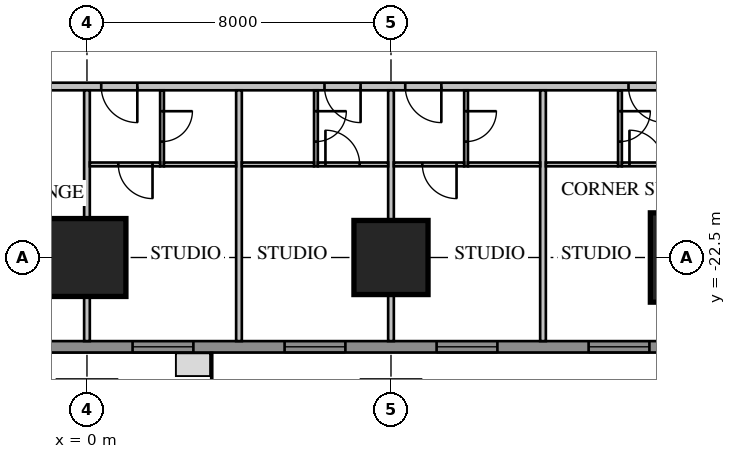
"""IFC4 building model, lengths in metres.
Left out: names, types, materials, properties, quantities, classifications, styles, units other than length and angle.
Written with IfcOpenShell. Run it as: python <this file> out.ifc"""

import sys

from ifc_helpers import new_model, si_unit, direction, frame, frame_2d, origin, origin_2d, place, context, subcontext, project, spatial, rectangle, extrude, element, fill, save


model = new_model("IFC4")
c1 = context("Model", 3, precision=1e-05, world=origin(), true_north=direction((0.0, 1.0)))
c2 = subcontext(c1, "Body", "Model", "MODEL_VIEW")
j1 = project(units=[si_unit("LENGTHUNIT", "METRE"), si_unit("PLANEANGLEUNIT", "RADIAN")], contexts=[c1])
p1 = place(None, origin())
s1 = spatial("IfcSite", under=j1, at=p1, CompositionType="ELEMENT")
p2 = place(p1, origin())
s2 = spatial("IfcBuilding", under=s1, at=p2, CompositionType="ELEMENT")
p3 = place(p2, frame((0.0, 0.0, 31.4)))
s3 = spatial("IfcBuildingStorey", under=s2, at=p3, CompositionType="ELEMENT", Elevation=31.4)
p4 = place(p3, frame((0.0, -22.5, 0.0), z_axis=(0.0, 0.0, 1.0), x_axis=(1.0, 0.0, 0.0)))
e1 = element("IfcColumn", 1, at=p4, inside=s3, PredefinedType="COLUMN", context=c2, shape_type="SweptSolid", body=[
    extrude(rectangle(XDim=2.05, YDim=2.05, at=origin_2d()), origin(), (0.0, 0.0, 1.0), 3.85),
])
p5 = place(p3, frame((8.0, -22.5, 0.0), z_axis=(0.0, 0.0, 1.0), x_axis=(1.0, 0.0, 0.0)))
e2 = element("IfcColumn", 2, at=p5, inside=s3, PredefinedType="COLUMN", context=c2, shape_type="SweptSolid", body=[
    extrude(rectangle(XDim=1.95, YDim=1.95, at=origin_2d()), origin(), (0.0, 0.0, 1.0), 3.85),
])
p6 = place(p3, frame((16.0, -22.5, 0.0), z_axis=(0.0, 0.0, 1.0), x_axis=(1.0, 0.0, 0.0)))
e3 = element("IfcColumn", 3, at=p6, inside=s3, PredefinedType="COLUMN", context=c2, shape_type="SweptSolid", body=[
    extrude(rectangle(XDim=2.35, YDim=2.35, at=origin_2d()), origin(), (0.0, 0.0, 1.0), 3.85),
])
p7 = place(p3, frame((-16.0, -24.85, 0.0), z_axis=(0.0, 0.0, 1.0), x_axis=(1.0, 0.0, 0.0)))
e4 = element("IfcWall", 4, at=p7, inside=s3, PredefinedType="SOLIDWALL", context=c2, shape_type="SweptSolid", body=[
    extrude(rectangle(XDim=32.0, YDim=0.3, at=frame_2d((16.0, 0.0))), origin(), (0.0, 0.0, 1.0), 3.65),
])
p8 = place(p7, frame((1.2, 0.0, 0.75)))
e5 = element("IfcOpeningElement", 5, at=p8, cuts=e4, PredefinedType="OPENING", context=c2, shape_type="SweptSolid", body=[
    extrude(rectangle(XDim=1.6, YDim=1.8, at=frame_2d((0.8, 0.9))), frame((0.0, 0.17, 0.0), z_axis=(0.0, -1.0, 0.0), x_axis=(1.0, 0.0, 0.0)), (0.0, 0.0, 1.0), 0.34),
])
p9 = place(p7, frame((5.2, 0.0, 0.75)))
e6 = element("IfcOpeningElement", 6, at=p9, cuts=e4, PredefinedType="OPENING", context=c2, shape_type="SweptSolid", body=[
    extrude(rectangle(XDim=1.6, YDim=1.8, at=frame_2d((0.8, 0.9))), frame((0.0, 0.17, 0.0), z_axis=(0.0, -1.0, 0.0), x_axis=(1.0, 0.0, 0.0)), (0.0, 0.0, 1.0), 0.34),
])
p10 = place(p7, frame((17.2, 0.0, 0.75)))
e7 = element("IfcOpeningElement", 7, at=p10, cuts=e4, PredefinedType="OPENING", context=c2, shape_type="SweptSolid", body=[
    extrude(rectangle(XDim=1.6, YDim=1.8, at=frame_2d((0.8, 0.9))), frame((0.0, 0.17, 0.0), z_axis=(0.0, -1.0, 0.0), x_axis=(1.0, 0.0, 0.0)), (0.0, 0.0, 1.0), 0.34),
])
p11 = place(p7, frame((21.2, 0.0, 0.75)))
e8 = element("IfcOpeningElement", 8, at=p11, cuts=e4, PredefinedType="OPENING", context=c2, shape_type="SweptSolid", body=[
    extrude(rectangle(XDim=1.6, YDim=1.8, at=frame_2d((0.8, 0.9))), frame((0.0, 0.17, 0.0), z_axis=(0.0, -1.0, 0.0), x_axis=(1.0, 0.0, 0.0)), (0.0, 0.0, 1.0), 0.34),
])
p12 = place(p7, frame((25.2, 0.0, 0.75)))
e9 = element("IfcOpeningElement", 9, at=p12, cuts=e4, PredefinedType="OPENING", context=c2, shape_type="SweptSolid", body=[
    extrude(rectangle(XDim=1.6, YDim=1.8, at=frame_2d((0.8, 0.9))), frame((0.0, 0.17, 0.0), z_axis=(0.0, -1.0, 0.0), x_axis=(1.0, 0.0, 0.0)), (0.0, 0.0, 1.0), 0.34),
])
p13 = place(p7, frame((29.2, 0.0, 0.75)))
e10 = element("IfcOpeningElement", 10, at=p13, cuts=e4, PredefinedType="OPENING", context=c2, shape_type="SweptSolid", body=[
    extrude(rectangle(XDim=1.6, YDim=1.8, at=frame_2d((0.8, 0.9))), frame((0.0, 0.17, 0.0), z_axis=(0.0, -1.0, 0.0), x_axis=(1.0, 0.0, 0.0)), (0.0, 0.0, 1.0), 0.34),
])
p14 = place(p7, frame((8.8, 0.0, 0.75)))
e11 = element("IfcOpeningElement", 11, at=p14, cuts=e4, PredefinedType="OPENING", context=c2, shape_type="SweptSolid", body=[
    extrude(rectangle(XDim=2.4, YDim=1.8, at=frame_2d((1.2, 0.9))), frame((0.0, 0.17, 0.0), z_axis=(0.0, -1.0, 0.0), x_axis=(1.0, 0.0, 0.0)), (0.0, 0.0, 1.0), 0.34),
])
p15 = place(p7, frame((13.812, 0.0, 0.0)))
e12 = element("IfcOpeningElement", 12, at=p15, cuts=e4, PredefinedType="OPENING", context=c2, shape_type="SweptSolid", body=[
    extrude(rectangle(XDim=1.0, YDim=2.4, at=frame_2d((0.5, 1.2))), frame((0.0, 0.17, 0.0), z_axis=(0.0, -1.0, 0.0), x_axis=(1.0, 0.0, 0.0)), (0.0, 0.0, 1.0), 0.34),
])
p16 = place(p3, frame((-18.0, -18.0, 0.0), z_axis=(0.0, 0.0, 1.0), x_axis=(1.0, 0.0, 0.0)))
e13 = element("IfcWall", 13, at=p16, inside=s3, PredefinedType="PARTITIONING", context=c2, shape_type="SweptSolid", body=[
    extrude(rectangle(XDim=36.0, YDim=0.2, at=frame_2d((18.0, 0.0))), origin(), (0.0, 0.0, 1.0), 3.65),
])
p17 = place(p16, frame((0.375, 0.0, 0.0)))
e14 = element("IfcOpeningElement", 14, at=p17, cuts=e13, PredefinedType="OPENING", context=c2, shape_type="SweptSolid", body=[
    extrude(rectangle(XDim=1.0, YDim=2.1, at=frame_2d((0.5, 1.05))), frame((0.0, 0.12, 0.0), z_axis=(0.0, -1.0, 0.0), x_axis=(1.0, 0.0, 0.0)), (0.0, 0.0, 1.0), 0.24),
])
p18 = place(p16, frame((2.45, 0.0, 0.0)))
e15 = element("IfcOpeningElement", 15, at=p18, cuts=e13, PredefinedType="OPENING", context=c2, shape_type="SweptSolid", body=[
    extrude(rectangle(XDim=0.8, YDim=2.1, at=frame_2d((0.4, 1.05))), frame((0.0, 0.12, 0.0), z_axis=(0.0, -1.0, 0.0), x_axis=(1.0, 0.0, 0.0)), (0.0, 0.0, 1.0), 0.24),
])
p19 = place(p16, frame((4.05, 0.0, 0.0)))
e16 = element("IfcOpeningElement", 16, at=p19, cuts=e13, PredefinedType="OPENING", context=c2, shape_type="SweptSolid", body=[
    extrude(rectangle(XDim=1.0, YDim=2.1, at=frame_2d((0.5, 1.05))), frame((0.0, 0.12, 0.0), z_axis=(0.0, -1.0, 0.0), x_axis=(1.0, 0.0, 0.0)), (0.0, 0.0, 1.0), 0.24),
])
p20 = place(p16, frame((6.45, 0.0, 0.0)))
e17 = element("IfcOpeningElement", 17, at=p20, cuts=e13, PredefinedType="OPENING", context=c2, shape_type="SweptSolid", body=[
    extrude(rectangle(XDim=0.9, YDim=2.1, at=frame_2d((0.45, 1.05))), frame((0.0, 0.12, 0.0), z_axis=(0.0, -1.0, 0.0), x_axis=(1.0, 0.0, 0.0)), (0.0, 0.0, 1.0), 0.24),
])
p21 = place(p16, frame((8.15, 0.0, 0.0)))
e18 = element("IfcOpeningElement", 18, at=p21, cuts=e13, PredefinedType="OPENING", context=c2, shape_type="SweptSolid", body=[
    extrude(rectangle(XDim=1.0, YDim=2.1, at=frame_2d((0.5, 1.05))), frame((0.0, 0.12, 0.0), z_axis=(0.0, -1.0, 0.0), x_axis=(1.0, 0.0, 0.0)), (0.0, 0.0, 1.0), 0.24),
])
p22 = place(p16, frame((18.375, 0.0, 0.0)))
e19 = element("IfcOpeningElement", 19, at=p22, cuts=e13, PredefinedType="OPENING", context=c2, shape_type="SweptSolid", body=[
    extrude(rectangle(XDim=0.95, YDim=2.1, at=frame_2d((0.475, 1.05))), frame((0.0, 0.12, 0.0), z_axis=(0.0, -1.0, 0.0), x_axis=(1.0, 0.0, 0.0)), (0.0, 0.0, 1.0), 0.24),
])
p23 = place(p16, frame((24.25, 0.0, 0.0)))
e20 = element("IfcOpeningElement", 20, at=p23, cuts=e13, PredefinedType="OPENING", context=c2, shape_type="SweptSolid", body=[
    extrude(rectangle(XDim=0.95, YDim=2.1, at=frame_2d((0.475, 1.05))), frame((0.0, 0.12, 0.0), z_axis=(0.0, -1.0, 0.0), x_axis=(1.0, 0.0, 0.0)), (0.0, 0.0, 1.0), 0.24),
])
p24 = place(p16, frame((26.375, 0.0, 0.0)))
e21 = element("IfcOpeningElement", 21, at=p24, cuts=e13, PredefinedType="OPENING", context=c2, shape_type="SweptSolid", body=[
    extrude(rectangle(XDim=0.95, YDim=2.1, at=frame_2d((0.475, 1.05))), frame((0.0, 0.12, 0.0), z_axis=(0.0, -1.0, 0.0), x_axis=(1.0, 0.0, 0.0)), (0.0, 0.0, 1.0), 0.24),
])
p25 = place(p16, frame((32.25, 0.0, 0.0)))
e22 = element("IfcOpeningElement", 22, at=p25, cuts=e13, PredefinedType="OPENING", context=c2, shape_type="SweptSolid", body=[
    extrude(rectangle(XDim=0.95, YDim=2.1, at=frame_2d((0.475, 1.05))), frame((0.0, 0.12, 0.0), z_axis=(0.0, -1.0, 0.0), x_axis=(1.0, 0.0, 0.0)), (0.0, 0.0, 1.0), 0.24),
])
p26 = place(p16, frame((34.375, 0.0, 0.0)))
e23 = element("IfcOpeningElement", 23, at=p26, cuts=e13, PredefinedType="OPENING", context=c2, shape_type="SweptSolid", body=[
    extrude(rectangle(XDim=0.95, YDim=2.1, at=frame_2d((0.475, 1.05))), frame((0.0, 0.12, 0.0), z_axis=(0.0, -1.0, 0.0), x_axis=(1.0, 0.0, 0.0)), (0.0, 0.0, 1.0), 0.24),
])
p27 = place(p16, frame((11.2, 0.0, 0.0)))
e24 = element("IfcOpeningElement", 24, at=p27, cuts=e13, PredefinedType="OPENING", context=c2, shape_type="SweptSolid", body=[
    extrude(rectangle(XDim=1.0, YDim=2.1, at=frame_2d((0.5, 1.05))), frame((0.0, 0.12, 0.0), z_axis=(0.0, -1.0, 0.0), x_axis=(1.0, 0.0, 0.0)), (0.0, 0.0, 1.0), 0.24),
])
p28 = place(p3, frame((0.0, -18.1, 0.0), z_axis=(0.0, 0.0, 1.0), x_axis=(0.0, -1.0, 0.0)))
e25 = element("IfcWall", 25, at=p28, inside=s3, PredefinedType="PARTITIONING", context=c2, shape_type="SweptSolid", body=[
    extrude(rectangle(XDim=6.6, YDim=0.15, at=frame_2d((3.3, 0.0))), origin(), (0.0, 0.0, 1.0), 2.809),
])
for number, where, z_axis, x_axis in (
    (26, (4.0, -18.1, 0.0), (0.0, 0.0, 1.0), (0.0, -1.0, 0.0)),
    (27, (8.0, -18.1, 0.0), (0.0, 0.0, 1.0), (0.0, -1.0, 0.0)),
    (28, (12.0, -18.1, 0.0), (0.0, 0.0, 1.0), (0.0, -1.0, 0.0)),
):
    element("IfcWall", number, at=place(p3, frame(where, z_axis=z_axis, x_axis=x_axis)), inside=s3, PredefinedType="PARTITIONING", context=c2, shape_type="SweptSolid", body=[
        extrude(rectangle(XDim=6.6, YDim=0.15, at=frame_2d((3.3, 0.0))), origin(), (0.0, 0.0, 1.0), 3.65),
    ])
p29 = place(p3, frame((1.975, -18.1, 0.0), z_axis=(0.0, 0.0, 1.0), x_axis=(0.0, -1.0, 0.0)))
e29 = element("IfcWall", 29, at=p29, inside=s3, PredefinedType="PARTITIONING", context=c2, shape_type="SweptSolid", body=[
    extrude(rectangle(XDim=2.0, YDim=0.1, at=frame_2d((1.0, 0.0))), origin(), (0.0, 0.0, 1.0), 3.65),
])
p30 = place(p29, frame((0.55, 0.0, 0.0)))
e30 = element("IfcOpeningElement", 30, at=p30, cuts=e29, PredefinedType="OPENING", context=c2, shape_type="SweptSolid", body=[
    extrude(rectangle(XDim=0.8, YDim=2.1, at=frame_2d((0.4, 1.05))), frame((0.0, 0.07, 0.0), z_axis=(0.0, -1.0, 0.0), x_axis=(1.0, 0.0, 0.0)), (0.0, 0.0, 1.0), 0.14),
])
p31 = place(p3, frame((2.025, -20.05, 0.0), z_axis=(0.0, 0.0, 1.0), x_axis=(1.0, 0.0, 0.0)))
e31 = element("IfcWall", 31, at=p31, inside=s3, PredefinedType="PARTITIONING", context=c2, shape_type="SweptSolid", body=[
    extrude(rectangle(XDim=1.9, YDim=0.1, at=frame_2d((0.95, 0.0))), origin(), (0.0, 0.0, 1.0), 3.65),
])
p32 = place(p3, frame((6.025, -18.1, 0.0), z_axis=(0.0, 0.0, 1.0), x_axis=(0.0, -1.0, 0.0)))
e32 = element("IfcWall", 32, at=p32, inside=s3, PredefinedType="PARTITIONING", context=c2, shape_type="SweptSolid", body=[
    extrude(rectangle(XDim=2.0, YDim=0.1, at=frame_2d((1.0, 0.0))), origin(), (0.0, 0.0, 1.0), 3.65),
])
p33 = place(p32, frame((0.55, 0.0, 0.0)))
e33 = element("IfcOpeningElement", 33, at=p33, cuts=e32, PredefinedType="OPENING", context=c2, shape_type="SweptSolid", body=[
    extrude(rectangle(XDim=0.8, YDim=2.1, at=frame_2d((0.4, 1.05))), frame((0.0, 0.07, 0.0), z_axis=(0.0, -1.0, 0.0), x_axis=(1.0, 0.0, 0.0)), (0.0, 0.0, 1.0), 0.14),
])
p34 = place(p3, frame((4.075, -20.05, 0.0), z_axis=(0.0, 0.0, 1.0), x_axis=(1.0, 0.0, 0.0)))
e34 = element("IfcWall", 34, at=p34, inside=s3, PredefinedType="PARTITIONING", context=c2, shape_type="SweptSolid", body=[
    extrude(rectangle(XDim=1.9, YDim=0.1, at=frame_2d((0.95, 0.0))), origin(), (0.0, 0.0, 1.0), 3.65),
])
p35 = place(p3, frame((9.975, -18.1, 0.0), z_axis=(0.0, 0.0, 1.0), x_axis=(0.0, -1.0, 0.0)))
e35 = element("IfcWall", 35, at=p35, inside=s3, PredefinedType="PARTITIONING", context=c2, shape_type="SweptSolid", body=[
    extrude(rectangle(XDim=2.0, YDim=0.1, at=frame_2d((1.0, 0.0))), origin(), (0.0, 0.0, 1.0), 3.65),
])
p36 = place(p35, frame((0.55, 0.0, 0.0)))
e36 = element("IfcOpeningElement", 36, at=p36, cuts=e35, PredefinedType="OPENING", context=c2, shape_type="SweptSolid", body=[
    extrude(rectangle(XDim=0.8, YDim=2.1, at=frame_2d((0.4, 1.05))), frame((0.0, 0.07, 0.0), z_axis=(0.0, -1.0, 0.0), x_axis=(1.0, 0.0, 0.0)), (0.0, 0.0, 1.0), 0.14),
])
p37 = place(p3, frame((10.025, -20.05, 0.0), z_axis=(0.0, 0.0, 1.0), x_axis=(1.0, 0.0, 0.0)))
e37 = element("IfcWall", 37, at=p37, inside=s3, PredefinedType="PARTITIONING", context=c2, shape_type="SweptSolid", body=[
    extrude(rectangle(XDim=1.9, YDim=0.1, at=frame_2d((0.95, 0.0))), origin(), (0.0, 0.0, 1.0), 3.65),
])
p38 = place(p3, frame((14.025, -18.1, 0.0), z_axis=(0.0, 0.0, 1.0), x_axis=(0.0, -1.0, 0.0)))
e38 = element("IfcWall", 38, at=p38, inside=s3, PredefinedType="PARTITIONING", context=c2, shape_type="SweptSolid", body=[
    extrude(rectangle(XDim=2.0, YDim=0.1, at=frame_2d((1.0, 0.0))), origin(), (0.0, 0.0, 1.0), 3.65),
])
p39 = place(p38, frame((0.55, 0.0, 0.0)))
e39 = element("IfcOpeningElement", 39, at=p39, cuts=e38, PredefinedType="OPENING", context=c2, shape_type="SweptSolid", body=[
    extrude(rectangle(XDim=0.8, YDim=2.1, at=frame_2d((0.4, 1.05))), frame((0.0, 0.07, 0.0), z_axis=(0.0, -1.0, 0.0), x_axis=(1.0, 0.0, 0.0)), (0.0, 0.0, 1.0), 0.14),
])
p40 = place(p3, frame((12.075, -20.05, 0.0), z_axis=(0.0, 0.0, 1.0), x_axis=(1.0, 0.0, 0.0)))
e40 = element("IfcWall", 40, at=p40, inside=s3, PredefinedType="PARTITIONING", context=c2, shape_type="SweptSolid", body=[
    extrude(rectangle(XDim=1.9, YDim=0.1, at=frame_2d((0.95, 0.0))), origin(), (0.0, 0.0, 1.0), 3.65),
])
p41 = place(p3, frame((0.075, -20.05, 0.0), z_axis=(0.0, 0.0, 1.0), x_axis=(1.0, 0.0, 0.0)))
e41 = element("IfcWall", 41, at=p41, inside=s3, PredefinedType="PARTITIONING", context=c2, shape_type="SweptSolid", body=[
    extrude(rectangle(XDim=1.85, YDim=0.1, at=frame_2d((0.925, 0.0))), origin(), (0.0, 0.0, 1.0), 3.65),
])
p42 = place(p41, frame((0.75, 0.0, 0.0)))
e42 = element("IfcOpeningElement", 42, at=p42, cuts=e41, PredefinedType="OPENING", context=c2, shape_type="SweptSolid", body=[
    extrude(rectangle(XDim=0.9, YDim=2.1, at=frame_2d((0.45, 1.05))), frame((0.0, 0.07, 0.0), z_axis=(0.0, -1.0, 0.0), x_axis=(1.0, 0.0, 0.0)), (0.0, 0.0, 1.0), 0.14),
])
p43 = place(p3, frame((6.075, -20.05, 0.0), z_axis=(0.0, 0.0, 1.0), x_axis=(1.0, 0.0, 0.0)))
e43 = element("IfcWall", 43, at=p43, inside=s3, PredefinedType="PARTITIONING", context=c2, shape_type="SweptSolid", body=[
    extrude(rectangle(XDim=1.85, YDim=0.1, at=frame_2d((0.925, 0.0))), origin(), (0.0, 0.0, 1.0), 3.65),
])
p44 = place(p43, frame((0.2, 0.0, 0.0)))
e44 = element("IfcOpeningElement", 44, at=p44, cuts=e43, PredefinedType="OPENING", context=c2, shape_type="SweptSolid", body=[
    extrude(rectangle(XDim=0.9, YDim=2.1, at=frame_2d((0.45, 1.05))), frame((0.0, 0.07, 0.0), z_axis=(0.0, -1.0, 0.0), x_axis=(1.0, 0.0, 0.0)), (0.0, 0.0, 1.0), 0.14),
])
p45 = place(p3, frame((8.075, -20.05, 0.0), z_axis=(0.0, 0.0, 1.0), x_axis=(1.0, 0.0, 0.0)))
e45 = element("IfcWall", 45, at=p45, inside=s3, PredefinedType="PARTITIONING", context=c2, shape_type="SweptSolid", body=[
    extrude(rectangle(XDim=1.85, YDim=0.1, at=frame_2d((0.925, 0.0))), origin(), (0.0, 0.0, 1.0), 3.65),
])
p46 = place(p45, frame((0.75, 0.0, 0.0)))
e46 = element("IfcOpeningElement", 46, at=p46, cuts=e45, PredefinedType="OPENING", context=c2, shape_type="SweptSolid", body=[
    extrude(rectangle(XDim=0.9, YDim=2.1, at=frame_2d((0.45, 1.05))), frame((0.0, 0.07, 0.0), z_axis=(0.0, -1.0, 0.0), x_axis=(1.0, 0.0, 0.0)), (0.0, 0.0, 1.0), 0.14),
])
p47 = place(p3, frame((14.075, -20.05, 0.0), z_axis=(0.0, 0.0, 1.0), x_axis=(1.0, 0.0, 0.0)))
e47 = element("IfcWall", 47, at=p47, inside=s3, PredefinedType="PARTITIONING", context=c2, shape_type="SweptSolid", body=[
    extrude(rectangle(XDim=1.85, YDim=0.1, at=frame_2d((0.925, 0.0))), origin(), (0.0, 0.0, 1.0), 3.65),
])
p48 = place(p47, frame((0.2, 0.0, 0.0)))
e48 = element("IfcOpeningElement", 48, at=p48, cuts=e47, PredefinedType="OPENING", context=c2, shape_type="SweptSolid", body=[
    extrude(rectangle(XDim=0.9, YDim=2.1, at=frame_2d((0.45, 1.05))), frame((0.0, 0.07, 0.0), z_axis=(0.0, -1.0, 0.0), x_axis=(1.0, 0.0, 0.0)), (0.0, 0.0, 1.0), 0.14),
])
p49 = place(p10, origin())
e49 = element("IfcWindow", 49, at=p49, inside=s3, PartitioningType="SINGLE_PANEL", PredefinedType="WINDOW", context=c2, shape_type="SweptSolid", body=[
    extrude(rectangle(XDim=1.6, YDim=1.8, at=frame_2d((0.8, 0.9))), frame((0.0, 0.03, 0.0), z_axis=(0.0, -1.0, 0.0), x_axis=(1.0, 0.0, 0.0)), (0.0, 0.0, 1.0), 0.06),
])
fill(e7, e49)
p50 = place(p11, origin())
e50 = element("IfcWindow", 50, at=p50, inside=s3, PartitioningType="SINGLE_PANEL", PredefinedType="WINDOW", context=c2, shape_type="SweptSolid", body=[
    extrude(rectangle(XDim=1.6, YDim=1.8, at=frame_2d((0.8, 0.9))), frame((0.0, 0.03, 0.0), z_axis=(0.0, -1.0, 0.0), x_axis=(1.0, 0.0, 0.0)), (0.0, 0.0, 1.0), 0.06),
])
fill(e8, e50)
p51 = place(p12, origin())
e51 = element("IfcWindow", 51, at=p51, inside=s3, PartitioningType="SINGLE_PANEL", PredefinedType="WINDOW", context=c2, shape_type="SweptSolid", body=[
    extrude(rectangle(XDim=1.6, YDim=1.8, at=frame_2d((0.8, 0.9))), frame((0.0, 0.03, 0.0), z_axis=(0.0, -1.0, 0.0), x_axis=(1.0, 0.0, 0.0)), (0.0, 0.0, 1.0), 0.06),
])
fill(e9, e51)
p52 = place(p13, origin())
e52 = element("IfcWindow", 52, at=p52, inside=s3, PartitioningType="SINGLE_PANEL", PredefinedType="WINDOW", context=c2, shape_type="SweptSolid", body=[
    extrude(rectangle(XDim=1.6, YDim=1.8, at=frame_2d((0.8, 0.9))), frame((0.0, 0.03, 0.0), z_axis=(0.0, -1.0, 0.0), x_axis=(1.0, 0.0, 0.0)), (0.0, 0.0, 1.0), 0.06),
])
fill(e10, e52)
p53 = place(p22, origin())
e53 = element("IfcDoor", 53, at=p53, inside=s3, OperationType="SINGLE_SWING_RIGHT", PredefinedType="DOOR", context=c2, shape_type="SweptSolid", body=[
    extrude(rectangle(XDim=0.95, YDim=2.1, at=frame_2d((0.475, 1.05))), frame((0.0, 0.025, 0.0), z_axis=(0.0, -1.0, 0.0), x_axis=(1.0, 0.0, 0.0)), (0.0, 0.0, 1.0), 0.05),
])
fill(e19, e53)
p54 = place(p30, origin())
e54 = element("IfcDoor", 54, at=p54, inside=s3, OperationType="SINGLE_SWING_LEFT", PredefinedType="DOOR", context=c2, shape_type="SweptSolid", body=[
    extrude(rectangle(XDim=0.8, YDim=2.1, at=frame_2d((0.4, 1.05))), frame((0.0, 0.025, 0.0), z_axis=(0.0, -1.0, 0.0), x_axis=(1.0, 0.0, 0.0)), (0.0, 0.0, 1.0), 0.05),
])
fill(e30, e54)
p55 = place(p23, origin())
e55 = element("IfcDoor", 55, at=p55, inside=s3, OperationType="SINGLE_SWING_RIGHT", PredefinedType="DOOR", context=c2, shape_type="SweptSolid", body=[
    extrude(rectangle(XDim=0.95, YDim=2.1, at=frame_2d((0.475, 1.05))), frame((0.0, 0.025, 0.0), z_axis=(0.0, -1.0, 0.0), x_axis=(1.0, 0.0, 0.0)), (0.0, 0.0, 1.0), 0.05),
])
fill(e20, e55)
p56 = place(p33, origin())
e56 = element("IfcDoor", 56, at=p56, inside=s3, OperationType="SINGLE_SWING_LEFT", PredefinedType="DOOR", context=c2, shape_type="SweptSolid", body=[
    extrude(rectangle(XDim=0.8, YDim=2.1, at=frame_2d((0.4, 1.05))), frame((0.0, 0.025, 0.0), z_axis=(0.0, -1.0, 0.0), x_axis=(1.0, 0.0, 0.0)), (0.0, 0.0, 1.0), 0.05),
])
fill(e33, e56)
p57 = place(p24, origin())
e57 = element("IfcDoor", 57, at=p57, inside=s3, OperationType="SINGLE_SWING_RIGHT", PredefinedType="DOOR", context=c2, shape_type="SweptSolid", body=[
    extrude(rectangle(XDim=0.95, YDim=2.1, at=frame_2d((0.475, 1.05))), frame((0.0, 0.025, 0.0), z_axis=(0.0, -1.0, 0.0), x_axis=(1.0, 0.0, 0.0)), (0.0, 0.0, 1.0), 0.05),
])
fill(e21, e57)
p58 = place(p36, origin())
e58 = element("IfcDoor", 58, at=p58, inside=s3, OperationType="SINGLE_SWING_LEFT", PredefinedType="DOOR", context=c2, shape_type="SweptSolid", body=[
    extrude(rectangle(XDim=0.8, YDim=2.1, at=frame_2d((0.4, 1.05))), frame((0.0, 0.025, 0.0), z_axis=(0.0, -1.0, 0.0), x_axis=(1.0, 0.0, 0.0)), (0.0, 0.0, 1.0), 0.05),
])
fill(e36, e58)
p59 = place(p25, origin())
e59 = element("IfcDoor", 59, at=p59, inside=s3, OperationType="SINGLE_SWING_RIGHT", PredefinedType="DOOR", context=c2, shape_type="SweptSolid", body=[
    extrude(rectangle(XDim=0.95, YDim=2.1, at=frame_2d((0.475, 1.05))), frame((0.0, 0.025, 0.0), z_axis=(0.0, -1.0, 0.0), x_axis=(1.0, 0.0, 0.0)), (0.0, 0.0, 1.0), 0.05),
])
fill(e22, e59)
p60 = place(p39, origin())
e60 = element("IfcDoor", 60, at=p60, inside=s3, OperationType="SINGLE_SWING_LEFT", PredefinedType="DOOR", context=c2, shape_type="SweptSolid", body=[
    extrude(rectangle(XDim=0.8, YDim=2.1, at=frame_2d((0.4, 1.05))), frame((0.0, 0.025, 0.0), z_axis=(0.0, -1.0, 0.0), x_axis=(1.0, 0.0, 0.0)), (0.0, 0.0, 1.0), 0.05),
])
fill(e39, e60)
p61 = place(p42, origin())
e61 = element("IfcDoor", 61, at=p61, inside=s3, OperationType="SINGLE_SWING_RIGHT", PredefinedType="DOOR", context=c2, shape_type="SweptSolid", body=[
    extrude(rectangle(XDim=0.9, YDim=2.1, at=frame_2d((0.45, 1.05))), frame((0.0, 0.025, 0.0), z_axis=(0.0, -1.0, 0.0), x_axis=(1.0, 0.0, 0.0)), (0.0, 0.0, 1.0), 0.05),
])
fill(e42, e61)
p62 = place(p44, origin())
e62 = element("IfcDoor", 62, at=p62, inside=s3, OperationType="SINGLE_SWING_LEFT", PredefinedType="DOOR", context=c2, shape_type="SweptSolid", body=[
    extrude(rectangle(XDim=0.9, YDim=2.1, at=frame_2d((0.45, 1.05))), frame((0.0, 0.025, 0.0), z_axis=(0.0, -1.0, 0.0), x_axis=(1.0, 0.0, 0.0)), (0.0, 0.0, 1.0), 0.05),
])
fill(e44, e62)
p63 = place(p46, origin())
e63 = element("IfcDoor", 63, at=p63, inside=s3, OperationType="SINGLE_SWING_RIGHT", PredefinedType="DOOR", context=c2, shape_type="SweptSolid", body=[
    extrude(rectangle(XDim=0.9, YDim=2.1, at=frame_2d((0.45, 1.05))), frame((0.0, 0.025, 0.0), z_axis=(0.0, -1.0, 0.0), x_axis=(1.0, 0.0, 0.0)), (0.0, 0.0, 1.0), 0.05),
])
fill(e46, e63)
p64 = place(p48, origin())
e64 = element("IfcDoor", 64, at=p64, inside=s3, OperationType="SINGLE_SWING_LEFT", PredefinedType="DOOR", context=c2, shape_type="SweptSolid", body=[
    extrude(rectangle(XDim=0.9, YDim=2.1, at=frame_2d((0.45, 1.05))), frame((0.0, 0.025, 0.0), z_axis=(0.0, -1.0, 0.0), x_axis=(1.0, 0.0, 0.0)), (0.0, 0.0, 1.0), 0.05),
])
fill(e48, e64)
save(model, sys.argv[1])
